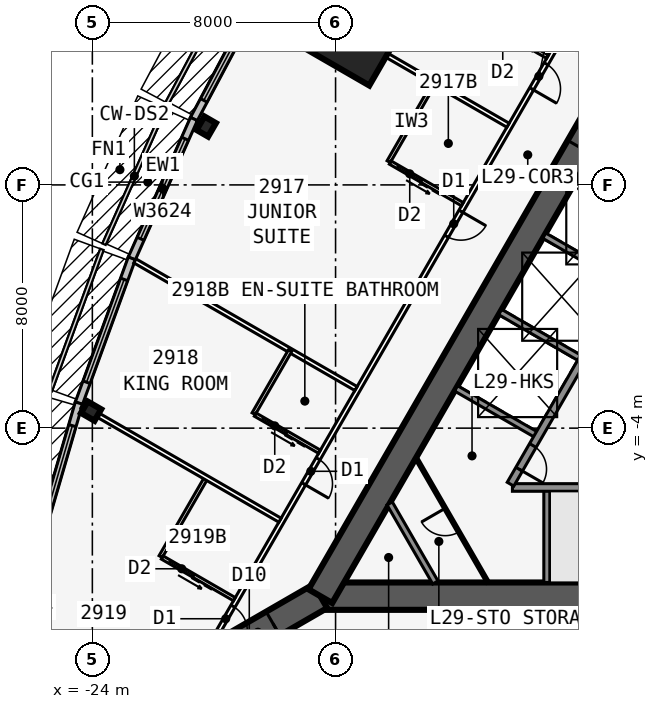
"""IFC4 building model, lengths in metres.
Left out: names, types, materials, properties, quantities, classifications, styles, units other than length and angle.
Written with IfcOpenShell. Run it as: python <this file> out.ifc"""

import sys

from ifc_helpers import new_model, si_unit, direction, frame, frame_2d, origin, origin_2d, place, context, subcontext, project, spatial, rectangle, i_section, extrude, element, fill, save


model = new_model("IFC4")
c1 = context("Model", 3, precision=1e-05, world=origin(), true_north=direction((0.0, 1.0)))
c2 = subcontext(c1, "Body", "Model", "MODEL_VIEW")
j1 = project(units=[si_unit("LENGTHUNIT", "METRE"), si_unit("PLANEANGLEUNIT", "RADIAN")], contexts=[c1])
p1 = place(None, origin())
s1 = spatial("IfcSite", under=j1, at=p1, CompositionType="ELEMENT")
p2 = place(p1, origin())
s2 = spatial("IfcBuilding", under=s1, at=p2, CompositionType="ELEMENT")
p3 = place(p2, frame((0.0, 0.0, 114.7)))
s3 = spatial("IfcBuildingStorey", under=s2, at=p3, CompositionType="ELEMENT", Elevation=114.7)
p4 = place(p3, frame((-16.5, -9.526, 0.0), z_axis=(0.0, 0.0, 1.0), x_axis=(1.0, 0.0, 0.0)))
e1 = element("IfcWall", 1, at=p4, inside=s3, PredefinedType="SHEAR", context=c2, shape_type="SweptSolid", body=[
    extrude(rectangle(XDim=33.0, YDim=0.9, at=frame_2d((16.5, 0.0))), origin(), (0.0, 0.0, 1.0), 3.4),
])
p5 = place(p4, frame((14.05, 0.0, 0.0)))
e2 = element("IfcOpeningElement", 2, at=p5, cuts=e1, PredefinedType="OPENING", context=c2, shape_type="SweptSolid", body=[
    extrude(rectangle(XDim=1.8, YDim=2.13, at=frame_2d((0.9, 1.065))), frame((0.0, 0.46, 0.0), z_axis=(0.0, -1.0, 0.0), x_axis=(1.0, 0.0, 0.0)), (0.0, 0.0, 1.0), 0.92),
])
p6 = place(p3, frame((-10.183, -5.951, 0.0), z_axis=(0.0, 0.0, 1.0), x_axis=(1.0, 0.0, 0.0)))
e3 = element("IfcWall", 3, at=p6, inside=s3, PredefinedType="SOLIDWALL", context=c2, shape_type="SweptSolid", body=[
    extrude(rectangle(XDim=7.633, YDim=0.25, at=frame_2d((3.816, 0.0))), origin(), (0.0, 0.0, 1.0), 3.235),
])
p7 = place(p3, frame((-9.05, -5.951, 0.0), z_axis=(0.0, 0.0, 1.0), x_axis=(0.0, -1.0, 0.0)))
e4 = element("IfcWall", 4, at=p7, inside=s3, PredefinedType="SOLIDWALL", context=c2, shape_type="SweptSolid", body=[
    extrude(rectangle(XDim=3.125, YDim=0.2, at=frame_2d((1.562, 0.0))), origin(), (0.0, 0.0, 1.0), 3.235),
])
p8 = place(p3, frame((0.0, 19.052, 0.0), z_axis=(0.0, 0.0, 1.0), x_axis=(-0.499999749417, -0.866025548458, 0.0)))
e5 = element("IfcWall", 5, at=p8, inside=s3, PredefinedType="SHEAR", context=c2, shape_type="SweptSolid", body=[
    extrude(rectangle(XDim=33.0, YDim=0.9, at=frame_2d((16.5, 0.0))), origin(), (0.0, 0.0, 1.0), 3.4),
])
p9 = place(p8, frame((14.15, 0.0, 0.0)))
e6 = element("IfcOpeningElement", 6, at=p9, cuts=e5, PredefinedType="OPENING", context=c2, shape_type="SweptSolid", body=[
    extrude(rectangle(XDim=1.8, YDim=2.13, at=frame_2d((0.9, 1.065))), frame((0.0, 0.46, 0.0), z_axis=(0.0, -1.0, 0.0), x_axis=(1.0, 0.0, 0.0)), (0.0, 0.0, 1.0), 0.92),
])
p10 = place(p8, frame((12.6, 0.0, 0.0)))
e7 = element("IfcOpeningElement", 7, at=p10, cuts=e5, PredefinedType="OPENING", context=c2, shape_type="SweptSolid", body=[
    extrude(rectangle(XDim=1.0, YDim=2.13, at=frame_2d((0.5, 1.065))), frame((0.0, 0.46, 0.0), z_axis=(0.0, -1.0, 0.0), x_axis=(1.0, 0.0, 0.0)), (0.0, 0.0, 1.0), 0.92),
])
p11 = place(p3, frame((-4.929, 3.365, 0.0), z_axis=(0.0, 0.0, 1.0), x_axis=(-0.499991433582, -0.866030349552, 0.0)))
e8 = element("IfcWall", 8, at=p11, inside=s3, PredefinedType="SOLIDWALL", context=c2, shape_type="SweptSolid", body=[
    extrude(rectangle(XDim=10.633, YDim=0.25, at=frame_2d((5.316, 0.0))), origin(), (0.0, 0.0, 1.0), 3.235),
])
p12 = place(p11, frame((9.164, 0.0, 0.0)))
e9 = element("IfcOpeningElement", 9, at=p12, cuts=e8, PredefinedType="OPENING", context=c2, shape_type="SweptSolid", body=[
    extrude(rectangle(XDim=0.9, YDim=2.13, at=frame_2d((0.45, 1.065))), frame((0.0, 0.135, 0.0), z_axis=(0.0, -1.0, 0.0), x_axis=(1.0, 0.0, 0.0)), (0.0, 0.0, 1.0), 0.27),
])
for number, where, z_axis, x_axis in (
    (10, (-6.429, 0.767, 0.0), (0.0, 0.0, 1.0), (-0.866, 0.5, 0.0)),
    (11, (-7.879, -1.744, 0.0), (0.0, 0.0, 1.0), (-0.866, 0.5, 0.0)),
    (12, (-9.329, -4.256, 0.0), (0.0, 0.0, 1.0), (-0.866, 0.5, 0.0)),
):
    element("IfcWall", number, at=place(p3, frame(where, z_axis=z_axis, x_axis=x_axis)), inside=s3, PredefinedType="SOLIDWALL", context=c2, shape_type="SweptSolid", body=[
        extrude(rectangle(XDim=3.125, YDim=0.2, at=frame_2d((1.562, 0.0))), origin(), (0.0, 0.0, 1.0), 3.235),
    ])
p13 = place(p3, frame((-16.5, -9.526, 0.0), z_axis=(0.0, 0.0, 1.0), x_axis=(-0.866031398331, -0.499989616998, 0.0)))
e13 = element("IfcWall", 13, at=p13, inside=s3, PredefinedType="SHEAR", context=c2, shape_type="SweptSolid", body=[
    extrude(rectangle(XDim=4.746, YDim=0.9, at=frame_2d((2.373, 0.0))), origin(), (0.0, 0.0, 1.0), 3.4),
])
p14 = place(p13, frame((1.8, 0.0, 0.0)))
e14 = element("IfcOpeningElement", 14, at=p14, cuts=e13, PredefinedType="OPENING", context=c2, shape_type="SweptSolid", body=[
    extrude(rectangle(XDim=1.8, YDim=2.13, at=frame_2d((0.9, 1.065))), frame((0.0, 0.46, 0.0), z_axis=(0.0, -1.0, 0.0), x_axis=(1.0, 0.0, 0.0)), (0.0, 0.0, 1.0), 0.92),
])
for number, where, z_axis, x_axis in (
    (15, (-20.254, 5.92, 0.0), (0.0, 0.0, 1.0), (-0.866, 0.5, 0.0)),
    (16, (-24.041, -3.44, 0.0), (0.0, 0.0, 1.0), (-0.5, -0.866, 0.0)),
):
    element("IfcColumn", number, at=place(p3, frame(where, z_axis=z_axis, x_axis=x_axis)), inside=s3, PredefinedType="COLUMN", context=c2, shape_type="SweptSolid", body=[
        extrude(i_section(OverallWidth=0.437, OverallDepth=0.513, WebThickness=0.061, FlangeThickness=0.097, at=origin_2d()), origin(), (0.0, 0.0, 1.0), 3.4),
    ])
p15 = place(p3, frame((-15.312, 8.84, 0.0), z_axis=(0.0, 0.0, 1.0), x_axis=(-0.866025403784, 0.5, 0.0)))
e17 = element("IfcColumn", 17, at=p15, inside=s3, PredefinedType="COLUMN", context=c2, shape_type="SweptSolid", body=[
    extrude(rectangle(XDim=2.3, YDim=2.3, at=origin_2d()), origin(), (0.0, 0.0, 1.0), 3.4),
])
p16 = place(p3, frame((-18.314, 10.579, 0.0), z_axis=(0.0, 0.0, 1.0), x_axis=(-0.469404966864, -0.882982999317, 0.0)))
e18 = element("IfcWall", 18, at=p16, inside=s3, PredefinedType="STANDARD", context=c2, shape_type="SweptSolid", body=[
    extrude(rectangle(XDim=5.003, YDim=0.25, at=frame_2d((2.501, 0.0))), origin(), (0.0, 0.0, 1.0), 3.235),
])
p17 = place(p16, frame((0.701, 0.0, 0.45)))
e19 = element("IfcOpeningElement", 19, at=p17, cuts=e18, PredefinedType="OPENING", context=c2, shape_type="SweptSolid", body=[
    extrude(rectangle(XDim=3.6, YDim=2.4, at=frame_2d((1.8, 1.2))), frame((0.0, 0.135, 0.0), z_axis=(0.0, -1.0, 0.0), x_axis=(1.0, 0.0, 0.0)), (0.0, 0.0, 1.0), 0.27),
])
p18 = place(p3, frame((-20.659, 6.169, 0.0), z_axis=(0.0, 0.0, 1.0), x_axis=(-0.406832200364, -0.913502906808, 0.0)))
e20 = element("IfcWall", 20, at=p18, inside=s3, PredefinedType="STANDARD", context=c2, shape_type="SweptSolid", body=[
    extrude(rectangle(XDim=5.028, YDim=0.25, at=frame_2d((2.514, 0.0))), origin(), (0.0, 0.0, 1.0), 3.235),
])
p19 = place(p18, frame((0.714, 0.0, 0.45)))
e21 = element("IfcOpeningElement", 21, at=p19, cuts=e20, PredefinedType="OPENING", context=c2, shape_type="SweptSolid", body=[
    extrude(rectangle(XDim=3.6, YDim=2.4, at=frame_2d((1.8, 1.2))), frame((0.0, 0.135, 0.0), z_axis=(0.0, -1.0, 0.0), x_axis=(1.0, 0.0, 0.0)), (0.0, 0.0, 1.0), 0.27),
])
p20 = place(p3, frame((-22.701, 1.584, 0.0), z_axis=(0.0, 0.0, 1.0), x_axis=(-0.343225593282, -0.939252996863, 0.0)))
e22 = element("IfcWall", 22, at=p20, inside=s3, PredefinedType="STANDARD", context=c2, shape_type="SweptSolid", body=[
    extrude(rectangle(XDim=5.076, YDim=0.25, at=frame_2d((2.538, 0.0))), origin(), (0.0, 0.0, 1.0), 3.235),
])
p21 = place(p20, frame((0.738, 0.0, 0.45)))
e23 = element("IfcOpeningElement", 23, at=p21, cuts=e22, PredefinedType="OPENING", context=c2, shape_type="SweptSolid", body=[
    extrude(rectangle(XDim=3.6, YDim=2.4, at=frame_2d((1.8, 1.2))), frame((0.0, 0.135, 0.0), z_axis=(0.0, -1.0, 0.0), x_axis=(1.0, 0.0, 0.0)), (0.0, 0.0, 1.0), 0.27),
])
p22 = place(p3, frame((-24.441, -3.175, 0.0), z_axis=(0.0, 0.0, 1.0), x_axis=(-0.279528287117, -0.960137457191, 0.0)))
e24 = element("IfcWall", 24, at=p22, inside=s3, PredefinedType="STANDARD", context=c2, shape_type="SweptSolid", body=[
    extrude(rectangle(XDim=5.148, YDim=0.25, at=frame_2d((2.574, 0.0))), origin(), (0.0, 0.0, 1.0), 3.235),
])
p23 = place(p22, frame((0.774, 0.0, 0.45)))
e25 = element("IfcOpeningElement", 25, at=p23, cuts=e24, PredefinedType="OPENING", context=c2, shape_type="SweptSolid", body=[
    extrude(rectangle(XDim=3.6, YDim=2.4, at=frame_2d((1.8, 1.2))), frame((0.0, 0.135, 0.0), z_axis=(0.0, -1.0, 0.0), x_axis=(1.0, 0.0, 0.0)), (0.0, 0.0, 1.0), 0.27),
])
p24 = place(p3, frame((-0.5, 22.836, 0.0), z_axis=(0.0, 0.0, 1.0), x_axis=(-0.500001677587, -0.866024435227, 0.0)))
e26 = element("IfcWall", 26, at=p24, inside=s3, PredefinedType="PARTITIONING", context=c2, shape_type="SweptSolid", body=[
    extrude(rectangle(XDim=39.054, YDim=0.15, at=frame_2d((19.527, 0.0))), origin(), (0.0, 0.0, 1.0), 3.235),
])
p25 = place(p24, frame((0.352, 0.0, 0.0)))
e27 = element("IfcOpeningElement", 27, at=p25, cuts=e26, PredefinedType="OPENING", context=c2, shape_type="SweptSolid", body=[
    extrude(rectangle(XDim=0.95, YDim=2.13, at=frame_2d((0.475, 1.065))), frame((0.0, 0.085, 0.0), z_axis=(0.0, -1.0, 0.0), x_axis=(1.0, 0.0, 0.0)), (0.0, 0.0, 1.0), 0.17),
])
p26 = place(p24, frame((7.152, 0.0, 0.0)))
e28 = element("IfcOpeningElement", 28, at=p26, cuts=e26, PredefinedType="OPENING", context=c2, shape_type="SweptSolid", body=[
    extrude(rectangle(XDim=0.95, YDim=2.13, at=frame_2d((0.475, 1.065))), frame((0.0, 0.085, 0.0), z_axis=(0.0, -1.0, 0.0), x_axis=(1.0, 0.0, 0.0)), (0.0, 0.0, 1.0), 0.17),
])
p27 = place(p24, frame((12.152, 0.0, 0.0)))
e29 = element("IfcOpeningElement", 29, at=p27, cuts=e26, PredefinedType="OPENING", context=c2, shape_type="SweptSolid", body=[
    extrude(rectangle(XDim=0.95, YDim=2.13, at=frame_2d((0.475, 1.065))), frame((0.0, 0.085, 0.0), z_axis=(0.0, -1.0, 0.0), x_axis=(1.0, 0.0, 0.0)), (0.0, 0.0, 1.0), 0.17),
])
p28 = place(p24, frame((17.152, 0.0, 0.0)))
e30 = element("IfcOpeningElement", 30, at=p28, cuts=e26, PredefinedType="OPENING", context=c2, shape_type="SweptSolid", body=[
    extrude(rectangle(XDim=0.95, YDim=2.13, at=frame_2d((0.475, 1.065))), frame((0.0, 0.085, 0.0), z_axis=(0.0, -1.0, 0.0), x_axis=(1.0, 0.0, 0.0)), (0.0, 0.0, 1.0), 0.17),
])
p29 = place(p24, frame((22.752, 0.0, 0.0)))
e31 = element("IfcOpeningElement", 31, at=p29, cuts=e26, PredefinedType="OPENING", context=c2, shape_type="SweptSolid", body=[
    extrude(rectangle(XDim=0.95, YDim=2.13, at=frame_2d((0.475, 1.065))), frame((0.0, 0.085, 0.0), z_axis=(0.0, -1.0, 0.0), x_axis=(1.0, 0.0, 0.0)), (0.0, 0.0, 1.0), 0.17),
])
p30 = place(p24, frame((32.152, 0.0, 0.0)))
e32 = element("IfcOpeningElement", 32, at=p30, cuts=e26, PredefinedType="OPENING", context=c2, shape_type="SweptSolid", body=[
    extrude(rectangle(XDim=0.95, YDim=2.13, at=frame_2d((0.475, 1.065))), frame((0.0, 0.085, 0.0), z_axis=(0.0, -1.0, 0.0), x_axis=(1.0, 0.0, 0.0)), (0.0, 0.0, 1.0), 0.17),
])
p31 = place(p24, frame((37.752, 0.0, 0.0)))
e33 = element("IfcOpeningElement", 33, at=p31, cuts=e26, PredefinedType="OPENING", context=c2, shape_type="SweptSolid", body=[
    extrude(rectangle(XDim=0.95, YDim=2.13, at=frame_2d((0.475, 1.065))), frame((0.0, 0.085, 0.0), z_axis=(0.0, -1.0, 0.0), x_axis=(1.0, 0.0, 0.0)), (0.0, 0.0, 1.0), 0.17),
])
p32 = place(p3, frame((-10.329, 5.963, 0.0), z_axis=(0.0, 0.0, 1.0), x_axis=(-0.866025170687, 0.500000403736, 0.0)))
e34 = element("IfcWall", 34, at=p32, inside=s3, PredefinedType="PARTITIONING", context=c2, shape_type="SweptSolid", body=[
    extrude(rectangle(XDim=9.099, YDim=0.15, at=frame_2d((4.549, 0.0))), origin(), (0.0, 0.0, 1.0), 2.389),
])
p33 = place(p3, frame((-15.329, -2.697, 0.0), z_axis=(0.0, 0.0, 1.0), x_axis=(-0.866024316602, 0.50000188305, 0.0)))
e35 = element("IfcWall", 35, at=p33, inside=s3, PredefinedType="PARTITIONING", context=c2, shape_type="SweptSolid", body=[
    extrude(rectangle(XDim=8.395, YDim=0.15, at=frame_2d((4.198, 0.0))), origin(), (0.0, 0.0, 1.0), 2.389),
])
p34 = place(p3, frame((-17.829, -7.027, 0.0), z_axis=(0.0, 0.0, 1.0), x_axis=(-0.866029804378, 0.499992377871, 0.0)))
e36 = element("IfcWall", 36, at=p34, inside=s3, PredefinedType="PARTITIONING", context=c2, shape_type="SweptSolid", body=[
    extrude(rectangle(XDim=7.516, YDim=0.15, at=frame_2d((3.758, 0.0))), origin(), (0.0, 0.0, 1.0), 2.389),
])
p35 = place(p3, frame((-9.029, 8.215, 0.0), z_axis=(0.0, 0.0, 1.0), x_axis=(-0.866023955769, 0.500002508028, 0.0)))
e37 = element("IfcWall", 37, at=p35, inside=s3, PredefinedType="PLUMBINGWALL", context=c2, shape_type="SweptSolid", body=[
    extrude(rectangle(XDim=2.44, YDim=0.12, at=frame_2d((1.22, 0.0))), origin(), (0.0, 0.0, 1.0), 3.235),
])
p36 = place(p35, frame((1.25, 0.0, 0.0)))
e38 = element("IfcOpeningElement", 38, at=p36, cuts=e37, PredefinedType="OPENING", context=c2, shape_type="SweptSolid", body=[
    extrude(rectangle(XDim=0.9, YDim=2.13, at=frame_2d((0.45, 1.065))), frame((0.0, 0.07, 0.0), z_axis=(0.0, -1.0, 0.0), x_axis=(1.0, 0.0, 0.0)), (0.0, 0.0, 1.0), 0.14),
])
p37 = place(p3, frame((-12.753, 7.363, 0.0), z_axis=(0.0, 0.0, 1.0), x_axis=(-0.50002537861, -0.866010750942, 0.0)))
e39 = element("IfcWall", 39, at=p37, inside=s3, PredefinedType="PLUMBINGWALL", context=c2, shape_type="SweptSolid", body=[
    extrude(rectangle(XDim=3.0, YDim=0.12, at=frame_2d((1.5, 0.0))), origin(), (0.0, 0.0, 1.0), 3.235),
])
p38 = place(p3, frame((-11.829, 3.365, 0.0), z_axis=(0.0, 0.0, 1.0), x_axis=(-0.865997131366, 0.500048966069, 0.0)))
e40 = element("IfcWall", 40, at=p38, inside=s3, PredefinedType="PLUMBINGWALL", context=c2, shape_type="SweptSolid", body=[
    extrude(rectangle(XDim=2.74, YDim=0.12, at=frame_2d((1.37, 0.0))), origin(), (0.0, 0.0, 1.0), 3.235),
])
p39 = place(p38, frame((1.55, 0.0, 0.0)))
e41 = element("IfcOpeningElement", 41, at=p39, cuts=e40, PredefinedType="OPENING", context=c2, shape_type="SweptSolid", body=[
    extrude(rectangle(XDim=0.9, YDim=2.13, at=frame_2d((0.45, 1.065))), frame((0.0, 0.07, 0.0), z_axis=(0.0, -1.0, 0.0), x_axis=(1.0, 0.0, 0.0)), (0.0, 0.0, 1.0), 0.14),
])
p40 = place(p3, frame((-17.493, -1.447, 0.0), z_axis=(0.0, 0.0, 1.0), x_axis=(-0.500033551112, -0.866006032174, 0.0)))
e42 = element("IfcWall", 42, at=p40, inside=s3, PredefinedType="PLUMBINGWALL", context=c2, shape_type="SweptSolid", body=[
    extrude(rectangle(XDim=2.4, YDim=0.12, at=frame_2d((1.2, 0.0))), origin(), (0.0, 0.0, 1.0), 3.235),
])
p41 = place(p3, frame((-16.529, -4.776, 0.0), z_axis=(0.0, 0.0, 1.0), x_axis=(-0.866023955769, 0.500002508028, 0.0)))
e43 = element("IfcWall", 43, at=p41, inside=s3, PredefinedType="PLUMBINGWALL", context=c2, shape_type="SweptSolid", body=[
    extrude(rectangle(XDim=2.44, YDim=0.12, at=frame_2d((1.22, 0.0))), origin(), (0.0, 0.0, 1.0), 3.235),
])
p42 = place(p41, frame((1.25, 0.0, 0.0)))
e44 = element("IfcOpeningElement", 44, at=p42, cuts=e43, PredefinedType="OPENING", context=c2, shape_type="SweptSolid", body=[
    extrude(rectangle(XDim=0.9, YDim=2.13, at=frame_2d((0.45, 1.065))), frame((0.0, 0.07, 0.0), z_axis=(0.0, -1.0, 0.0), x_axis=(1.0, 0.0, 0.0)), (0.0, 0.0, 1.0), 0.14),
])
p43 = place(p3, frame((-20.253, -5.627, 0.0), z_axis=(0.0, 0.0, 1.0), x_axis=(-0.499990139034, -0.866031096941, 0.0)))
e45 = element("IfcWall", 45, at=p43, inside=s3, PredefinedType="PLUMBINGWALL", context=c2, shape_type="SweptSolid", body=[
    extrude(rectangle(XDim=3.0, YDim=0.12, at=frame_2d((1.5, 0.0))), origin(), (0.0, 0.0, 1.0), 3.235),
])
p44 = place(p3, frame((-19.329, -9.625, 0.0), z_axis=(0.0, 0.0, 1.0), x_axis=(-0.866035715982, 0.499982138324, 0.0)))
e46 = element("IfcWall", 46, at=p44, inside=s3, PredefinedType="PLUMBINGWALL", context=c2, shape_type="SweptSolid", body=[
    extrude(rectangle(XDim=2.74, YDim=0.12, at=frame_2d((1.37, 0.0))), origin(), (0.0, 0.0, 1.0), 3.235),
])
p45 = place(p44, frame((1.55, 0.0, 0.0)))
e47 = element("IfcOpeningElement", 47, at=p45, cuts=e46, PredefinedType="OPENING", context=c2, shape_type="SweptSolid", body=[
    extrude(rectangle(XDim=0.9, YDim=2.13, at=frame_2d((0.45, 1.065))), frame((0.0, 0.07, 0.0), z_axis=(0.0, -1.0, 0.0), x_axis=(1.0, 0.0, 0.0)), (0.0, 0.0, 1.0), 0.14),
])
p46 = place(p3, frame((-12.719, -9.076, 0.0), z_axis=(0.0, 0.0, 1.0), x_axis=(-0.499952404951, 0.866052881055, 0.0)))
e48 = element("IfcWall", 48, at=p46, inside=s3, PredefinedType="SOLIDWALL", context=c2, shape_type="SweptSolid", body=[
    extrude(rectangle(XDim=3.002, YDim=0.2, at=frame_2d((1.501, 0.0))), origin(), (0.0, 0.0, 1.0), 3.235),
])
p47 = place(p3, frame((-10.986, -9.076, 0.0), z_axis=(0.0, 0.0, 1.0), x_axis=(-0.499999210213, 0.866025859768, 0.0)))
e49 = element("IfcWall", 49, at=p47, inside=s3, PredefinedType="PARTITIONING", context=c2, shape_type="SweptSolid", body=[
    extrude(rectangle(XDim=4.734, YDim=0.1, at=frame_2d((2.367, 0.0))), origin(), (0.0, 0.0, 1.0), 3.235),
])
p48 = place(p47, frame((1.917, 0.0, 0.0)))
e50 = element("IfcOpeningElement", 50, at=p48, cuts=e49, PredefinedType="OPENING", context=c2, shape_type="SweptSolid", body=[
    extrude(rectangle(XDim=0.9, YDim=2.13, at=frame_2d((0.45, 1.065))), frame((0.0, 0.06, 0.0), z_axis=(0.0, -1.0, 0.0), x_axis=(1.0, 0.0, 0.0)), (0.0, 0.0, 1.0), 0.12),
])
p49 = place(p17, origin())
e51 = element("IfcWindow", 51, at=p49, inside=s3, PartitioningType="SINGLE_PANEL", PredefinedType="WINDOW", context=c2, shape_type="SweptSolid", body=[
    extrude(rectangle(XDim=3.6, YDim=2.4, at=frame_2d((1.8, 1.2))), frame((0.0, 0.03, 0.0), z_axis=(0.0, -1.0, 0.0), x_axis=(1.0, 0.0, 0.0)), (0.0, 0.0, 1.0), 0.06),
])
fill(e19, e51)
p50 = place(p19, origin())
e52 = element("IfcWindow", 52, at=p50, inside=s3, PartitioningType="SINGLE_PANEL", PredefinedType="WINDOW", context=c2, shape_type="SweptSolid", body=[
    extrude(rectangle(XDim=3.6, YDim=2.4, at=frame_2d((1.8, 1.2))), frame((0.0, 0.03, 0.0), z_axis=(0.0, -1.0, 0.0), x_axis=(1.0, 0.0, 0.0)), (0.0, 0.0, 1.0), 0.06),
])
fill(e21, e52)
p51 = place(p21, origin())
e53 = element("IfcWindow", 53, at=p51, inside=s3, PartitioningType="SINGLE_PANEL", PredefinedType="WINDOW", context=c2, shape_type="SweptSolid", body=[
    extrude(rectangle(XDim=3.6, YDim=2.4, at=frame_2d((1.8, 1.2))), frame((0.0, 0.03, 0.0), z_axis=(0.0, -1.0, 0.0), x_axis=(1.0, 0.0, 0.0)), (0.0, 0.0, 1.0), 0.06),
])
fill(e23, e53)
p52 = place(p23, origin())
e54 = element("IfcWindow", 54, at=p52, inside=s3, PartitioningType="SINGLE_PANEL", PredefinedType="WINDOW", context=c2, shape_type="SweptSolid", body=[
    extrude(rectangle(XDim=3.6, YDim=2.4, at=frame_2d((1.8, 1.2))), frame((0.0, 0.03, 0.0), z_axis=(0.0, -1.0, 0.0), x_axis=(1.0, 0.0, 0.0)), (0.0, 0.0, 1.0), 0.06),
])
fill(e25, e54)
p53 = place(p28, origin())
e55 = element("IfcDoor", 55, at=p53, inside=s3, OperationType="SINGLE_SWING_RIGHT", PredefinedType="DOOR", context=c2, shape_type="SweptSolid", body=[
    extrude(rectangle(XDim=0.95, YDim=2.13, at=frame_2d((0.475, 1.065))), frame((0.0, 0.025, 0.0), z_axis=(0.0, -1.0, 0.0), x_axis=(1.0, 0.0, 0.0)), (0.0, 0.0, 1.0), 0.05),
])
fill(e30, e55)
p54 = place(p39, origin())
e56 = element("IfcDoor", 56, at=p54, inside=s3, OperationType="SLIDING_TO_LEFT", PredefinedType="DOOR", context=c2, shape_type="SweptSolid", body=[
    extrude(rectangle(XDim=0.9, YDim=2.13, at=frame_2d((0.45, 1.065))), frame((0.0, 0.025, 0.0), z_axis=(0.0, -1.0, 0.0), x_axis=(1.0, 0.0, 0.0)), (0.0, 0.0, 1.0), 0.05),
])
fill(e41, e56)
p55 = place(p29, origin())
e57 = element("IfcDoor", 57, at=p55, inside=s3, OperationType="SINGLE_SWING_LEFT", PredefinedType="DOOR", context=c2, shape_type="SweptSolid", body=[
    extrude(rectangle(XDim=0.95, YDim=2.13, at=frame_2d((0.475, 1.065))), frame((0.0, 0.025, 0.0), z_axis=(0.0, -1.0, 0.0), x_axis=(1.0, 0.0, 0.0)), (0.0, 0.0, 1.0), 0.05),
])
fill(e31, e57)
p56 = place(p42, origin())
e58 = element("IfcDoor", 58, at=p56, inside=s3, OperationType="SLIDING_TO_LEFT", PredefinedType="DOOR", context=c2, shape_type="SweptSolid", body=[
    extrude(rectangle(XDim=0.9, YDim=2.13, at=frame_2d((0.45, 1.065))), frame((0.0, 0.025, 0.0), z_axis=(0.0, -1.0, 0.0), x_axis=(1.0, 0.0, 0.0)), (0.0, 0.0, 1.0), 0.05),
])
fill(e44, e58)
p57 = place(p30, origin())
e59 = element("IfcDoor", 59, at=p57, inside=s3, OperationType="SINGLE_SWING_RIGHT", PredefinedType="DOOR", context=c2, shape_type="SweptSolid", body=[
    extrude(rectangle(XDim=0.95, YDim=2.13, at=frame_2d((0.475, 1.065))), frame((0.0, 0.025, 0.0), z_axis=(0.0, -1.0, 0.0), x_axis=(1.0, 0.0, 0.0)), (0.0, 0.0, 1.0), 0.05),
])
fill(e32, e59)
p58 = place(p45, origin())
e60 = element("IfcDoor", 60, at=p58, inside=s3, OperationType="SLIDING_TO_LEFT", PredefinedType="DOOR", context=c2, shape_type="SweptSolid", body=[
    extrude(rectangle(XDim=0.9, YDim=2.13, at=frame_2d((0.45, 1.065))), frame((0.0, 0.025, 0.0), z_axis=(0.0, -1.0, 0.0), x_axis=(1.0, 0.0, 0.0)), (0.0, 0.0, 1.0), 0.05),
])
fill(e47, e60)
p59 = place(p31, origin())
e61 = element("IfcDoor", 61, at=p59, inside=s3, OperationType="SINGLE_SWING_RIGHT", PredefinedType="DOOR", context=c2, shape_type="SweptSolid", body=[
    extrude(rectangle(XDim=0.95, YDim=2.13, at=frame_2d((0.475, 1.065))), frame((0.0, 0.025, 0.0), z_axis=(0.0, -1.0, 0.0), x_axis=(1.0, 0.0, 0.0)), (0.0, 0.0, 1.0), 0.05),
])
fill(e33, e61)
p60 = place(p14, origin())
e62 = element("IfcDoor", 62, at=p60, inside=s3, OperationType="DOUBLE_DOOR_DOUBLE_SWING", PredefinedType="DOOR", context=c2, shape_type="SweptSolid", body=[
    extrude(rectangle(XDim=1.8, YDim=2.13, at=frame_2d((0.9, 1.065))), frame((0.0, 0.025, 0.0), z_axis=(0.0, -1.0, 0.0), x_axis=(1.0, 0.0, 0.0)), (0.0, 0.0, 1.0), 0.05),
])
fill(e14, e62)
p61 = place(p48, origin())
e63 = element("IfcDoor", 63, at=p61, inside=s3, OperationType="SINGLE_SWING_RIGHT", PredefinedType="DOOR", context=c2, shape_type="SweptSolid", body=[
    extrude(rectangle(XDim=0.9, YDim=2.13, at=frame_2d((0.45, 1.065))), frame((0.0, 0.025, 0.0), z_axis=(0.0, -1.0, 0.0), x_axis=(1.0, 0.0, 0.0)), (0.0, 0.0, 1.0), 0.05),
])
fill(e50, e63)
p62 = place(p12, origin())
e64 = element("IfcDoor", 64, at=p62, inside=s3, OperationType="SINGLE_SWING_RIGHT", PredefinedType="DOOR", context=c2, shape_type="SweptSolid", body=[
    extrude(rectangle(XDim=0.9, YDim=2.13, at=frame_2d((0.45, 1.065))), frame((0.0, 0.025, 0.0), z_axis=(0.0, -1.0, 0.0), x_axis=(1.0, 0.0, 0.0)), (0.0, 0.0, 1.0), 0.05),
])
fill(e9, e64)
save(model, sys.argv[1])
